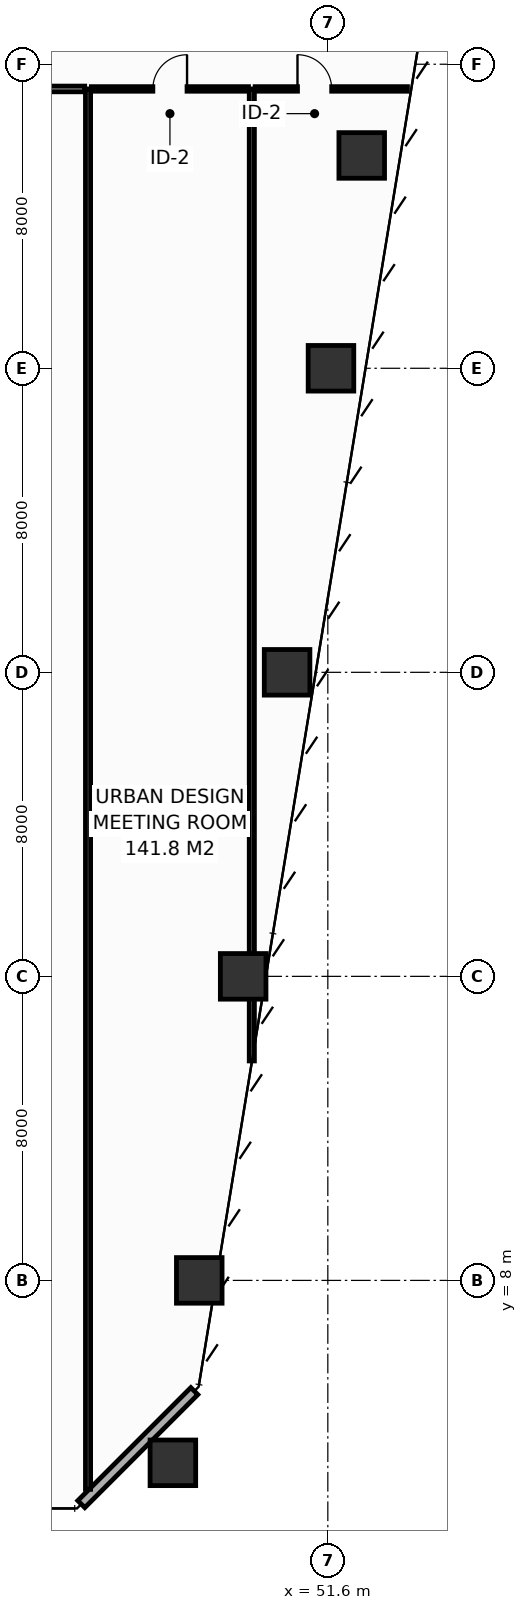
"""IFC4 building model, lengths in metres.
Left out: names, types, materials, properties, quantities, classifications, styles, units other than length and angle.
Written with IfcOpenShell. Run it as: python <this file> out.ifc"""

import sys

from ifc_helpers import new_model, si_unit, direction, frame, frame_2d, origin, origin_2d, place, context, subcontext, project, spatial, rectangle, hollow_rectangle, extrude, element, fill, save


model = new_model("IFC4")
c1 = context("Model", 3, precision=1e-05, world=origin(), true_north=direction((0.0, 1.0)))
c2 = subcontext(c1, "Body", "Model", "MODEL_VIEW")
j1 = project(units=[si_unit("LENGTHUNIT", "METRE"), si_unit("PLANEANGLEUNIT", "RADIAN")], contexts=[c1])
p1 = place(None, origin())
s1 = spatial("IfcSite", under=j1, at=p1, CompositionType="ELEMENT")
p2 = place(p1, origin())
s2 = spatial("IfcBuilding", under=s1, at=p2, CompositionType="ELEMENT")
p3 = place(p2, frame((0.0, 0.0, 56.0)))
s3 = spatial("IfcBuildingStorey", under=s2, at=p3, CompositionType="ELEMENT", Elevation=56.0)
for number, where, z_axis, x_axis in (
    (1, (47.523, 3.2, 0.0), (0.0, 0.0, 1.0), (1.0, 0.0, 0.0)),
    (2, (48.217, 8.0, 0.0), (0.0, 0.0, 1.0), (1.0, 0.0, 0.0)),
    (3, (49.372, 16.0, 0.0), (0.0, 0.0, 1.0), (1.0, 0.0, 0.0)),
    (4, (50.528, 24.0, 0.0), (0.0, 0.0, 1.0), (1.0, 0.0, 0.0)),
    (5, (51.683, 32.0, 0.0), (0.0, 0.0, 1.0), (1.0, 0.0, 0.0)),
    (6, (52.492, 37.6, 0.0), (0.0, 0.0, 1.0), (1.0, 0.0, 0.0)),
):
    element("IfcColumn", number, at=place(p3, frame(where, z_axis=z_axis, x_axis=x_axis)), inside=s3, PredefinedType="COLUMN", context=c2, shape_type="SweptSolid", body=[
        extrude(hollow_rectangle(XDim=1.2, YDim=1.2, WallThickness=0.055, at=origin_2d()), origin(), (0.0, 0.0, 1.0), 4.4),
    ])
p4 = place(p3, frame((45.113, 2.113, 0.0), z_axis=(0.0, 0.0, 1.0), x_axis=(0.707106781187, 0.707106781187, 0.0)))
e7 = element("IfcWall", 7, at=p4, inside=s3, PredefinedType="STANDARD", context=c2, shape_type="SweptSolid", body=[
    extrude(rectangle(XDim=4.206, YDim=0.26, at=frame_2d((2.103, 0.0))), origin(), (0.0, 0.0, 1.0), 4.15),
])
p5 = place(p3, frame((45.29, 2.502, 0.0), z_axis=(0.0, 0.0, 1.0), x_axis=(0.0, 1.0, 0.0)))
e8 = element("IfcWall", 8, at=p5, inside=s3, PredefinedType="PARTITIONING", context=c2, shape_type="SweptSolid", body=[
    extrude(rectangle(XDim=36.848, YDim=0.135, at=frame_2d((18.424, 0.0))), origin(), (0.0, 0.0, 1.0), 3.335),
])
p6 = place(p3, frame((49.6, 13.774, 0.0), z_axis=(0.0, 0.0, 1.0), x_axis=(0.0, 1.0, 0.0)))
e9 = element("IfcWall", 9, at=p6, inside=s3, PredefinedType="PARTITIONING", context=c2, shape_type="SweptSolid", body=[
    extrude(rectangle(XDim=25.576, YDim=0.135, at=frame_2d((12.788, 0.0))), origin(), (0.0, 0.0, 1.0), 3.335),
])
p7 = place(p3, frame((41.067, 39.35, 0.0), z_axis=(0.0, 0.0, 1.0), x_axis=(1.0, 0.0, 0.0)))
e10 = element("IfcWall", 10, at=p7, inside=s3, PredefinedType="PARTITIONING", context=c2, shape_type="SweptSolid", body=[
    extrude(rectangle(XDim=4.135, YDim=0.15, at=frame_2d((2.067, 0.0))), origin(), (0.0, 0.0, 1.0), 4.15),
])
p8 = place(p7, frame((1.567, 0.0, 0.0)))
e11 = element("IfcOpeningElement", 11, at=p8, cuts=e10, PredefinedType="OPENING", context=c2, shape_type="SweptSolid", body=[
    extrude(rectangle(XDim=1.0, YDim=2.15, at=frame_2d((0.5, 1.075))), frame((0.0, 0.085, 0.0), z_axis=(0.0, -1.0, 0.0), x_axis=(1.0, 0.0, 0.0)), (0.0, 0.0, 1.0), 0.17),
])
p9 = place(p3, frame((45.377, 39.35, 0.0), z_axis=(0.0, 0.0, 1.0), x_axis=(1.0, 0.0, 0.0)))
e12 = element("IfcWall", 12, at=p9, inside=s3, PredefinedType="PARTITIONING", context=c2, shape_type="SweptSolid", body=[
    extrude(rectangle(XDim=4.135, YDim=0.12, at=frame_2d((2.067, 0.0))), origin(), (0.0, 0.0, 1.0), 4.15),
])
p10 = place(p9, frame((1.618, 0.0, 0.0)))
e13 = element("IfcOpeningElement", 13, at=p10, cuts=e12, PredefinedType="OPENING", context=c2, shape_type="SweptSolid", body=[
    extrude(rectangle(XDim=0.9, YDim=2.1, at=frame_2d((0.45, 1.05))), frame((0.0, 0.07, 0.0), z_axis=(0.0, -1.0, 0.0), x_axis=(1.0, 0.0, 0.0)), (0.0, 0.0, 1.0), 0.14),
])
p11 = place(p3, frame((49.688, 39.35, 0.0), z_axis=(0.0, 0.0, 1.0), x_axis=(1.0, 0.0, 0.0)))
e14 = element("IfcWall", 14, at=p11, inside=s3, PredefinedType="PARTITIONING", context=c2, shape_type="SweptSolid", body=[
    extrude(rectangle(XDim=4.008, YDim=0.12, at=frame_2d((2.004, 0.0))), origin(), (0.0, 0.0, 1.0), 3.635),
])
p12 = place(p11, frame((1.114, 0.0, 0.0)))
e15 = element("IfcOpeningElement", 15, at=p12, cuts=e14, PredefinedType="OPENING", context=c2, shape_type="SweptSolid", body=[
    extrude(rectangle(XDim=0.9, YDim=2.1, at=frame_2d((0.45, 1.05))), frame((0.0, 0.07, 0.0), z_axis=(0.0, -1.0, 0.0), x_axis=(1.0, 0.0, 0.0)), (0.0, 0.0, 1.0), 0.14),
])
p13 = place(p10, origin())
e16 = element("IfcDoor", 16, at=p13, inside=s3, OperationType="SINGLE_SWING_RIGHT", PredefinedType="DOOR", context=c2, shape_type="SweptSolid", body=[
    extrude(rectangle(XDim=0.9, YDim=2.1, at=frame_2d((0.45, 1.05))), frame((0.0, 0.025, 0.0), z_axis=(0.0, -1.0, 0.0), x_axis=(1.0, 0.0, 0.0)), (0.0, 0.0, 1.0), 0.05),
])
fill(e13, e16)
p14 = place(p12, origin())
e17 = element("IfcDoor", 17, at=p14, inside=s3, OperationType="SINGLE_SWING_LEFT", PredefinedType="DOOR", context=c2, shape_type="SweptSolid", body=[
    extrude(rectangle(XDim=0.9, YDim=2.1, at=frame_2d((0.45, 1.05))), frame((0.0, 0.025, 0.0), z_axis=(0.0, -1.0, 0.0), x_axis=(1.0, 0.0, 0.0)), (0.0, 0.0, 1.0), 0.05),
])
fill(e15, e17)
save(model, sys.argv[1])
